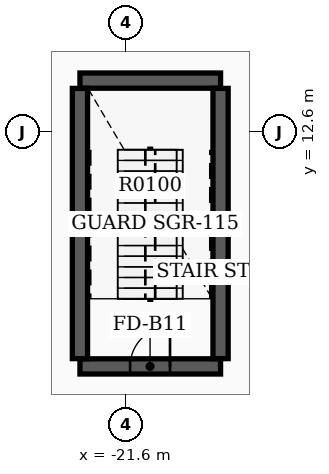
"""IFC4 building model, lengths in metres.
Left out: names, types, materials, properties, quantities, classifications, styles, units other than length and angle.
Written with IfcOpenShell. Run it as: python <this file> out.ifc"""

import sys

from ifc_helpers import new_model, si_unit, direction, frame, frame_2d, origin, place, context, subcontext, project, spatial, rectangle, extrude, element, fill, save


model = new_model("IFC4")
c1 = context("Model", 3, precision=1e-05, world=origin(), true_north=direction((0.0, 1.0)))
c2 = subcontext(c1, "Body", "Model", "MODEL_VIEW")
j1 = project(units=[si_unit("LENGTHUNIT", "METRE"), si_unit("PLANEANGLEUNIT", "RADIAN")], contexts=[c1])
p1 = place(None, origin())
s1 = spatial("IfcSite", under=j1, at=p1, CompositionType="ELEMENT")
p2 = place(p1, origin())
s2 = spatial("IfcBuilding", under=s1, at=p2, CompositionType="ELEMENT")
p3 = place(p2, origin())
s3 = spatial("IfcBuildingStorey", under=s2, at=p3, CompositionType="ELEMENT", Elevation=0.0)
p4 = place(p3, frame((-22.82, 13.95, 0.0), z_axis=(0.0, 0.0, 1.0), x_axis=(1.0, 0.0, 0.0)))
e1 = element("IfcWall", 1, at=p4, inside=s3, PredefinedType="SHEAR", context=c2, shape_type="SweptSolid", body=[
    extrude(rectangle(XDim=3.7, YDim=0.4, at=frame_2d((1.85, 0.0))), origin(), (0.0, 0.0, 1.0), 5.15),
])
p5 = place(p3, frame((-22.82, 6.43, 0.0), z_axis=(0.0, 0.0, 1.0), x_axis=(1.0, 0.0, 0.0)))
e2 = element("IfcWall", 2, at=p5, inside=s3, PredefinedType="SHEAR", context=c2, shape_type="SweptSolid", body=[
    extrude(rectangle(XDim=3.7, YDim=0.4, at=frame_2d((1.85, 0.0))), origin(), (0.0, 0.0, 1.0), 5.15),
])
p6 = place(p5, frame((1.32, 0.0, 0.0)))
e3 = element("IfcOpeningElement", 3, at=p6, cuts=e2, PredefinedType="OPENING", context=c2, shape_type="SweptSolid", body=[
    extrude(rectangle(XDim=1.05, YDim=2.15, at=frame_2d((0.525, 1.075))), frame((0.0, 0.21, 0.0), z_axis=(0.0, -1.0, 0.0), x_axis=(1.0, 0.0, 0.0)), (0.0, 0.0, 1.0), 0.42),
])
for number, where, z_axis, x_axis in (
    (4, (-22.82, 6.635, 0.0), (0.0, 0.0, 1.0), (0.0, 1.0, 0.0)),
    (5, (-19.12, 6.635, 0.0), (0.0, 0.0, 1.0), (0.0, 1.0, 0.0)),
):
    element("IfcWall", number, at=place(p3, frame(where, z_axis=z_axis, x_axis=x_axis)), inside=s3, PredefinedType="SHEAR", context=c2, shape_type="SweptSolid", body=[
        extrude(rectangle(XDim=7.11, YDim=0.4, at=frame_2d((3.555, 0.0))), origin(), (0.0, 0.0, 1.0), 5.15),
    ])
p7 = place(p6, origin())
e6 = element("IfcDoor", 6, at=p7, inside=s3, OperationType="SINGLE_SWING_RIGHT", PredefinedType="DOOR", context=c2, shape_type="SweptSolid", body=[
    extrude(rectangle(XDim=1.05, YDim=2.15, at=frame_2d((0.525, 1.075))), frame((0.0, 0.025, 0.0), z_axis=(0.0, -1.0, 0.0), x_axis=(1.0, 0.0, 0.0)), (0.0, 0.0, 1.0), 0.05),
])
fill(e3, e6)
save(model, sys.argv[1])
